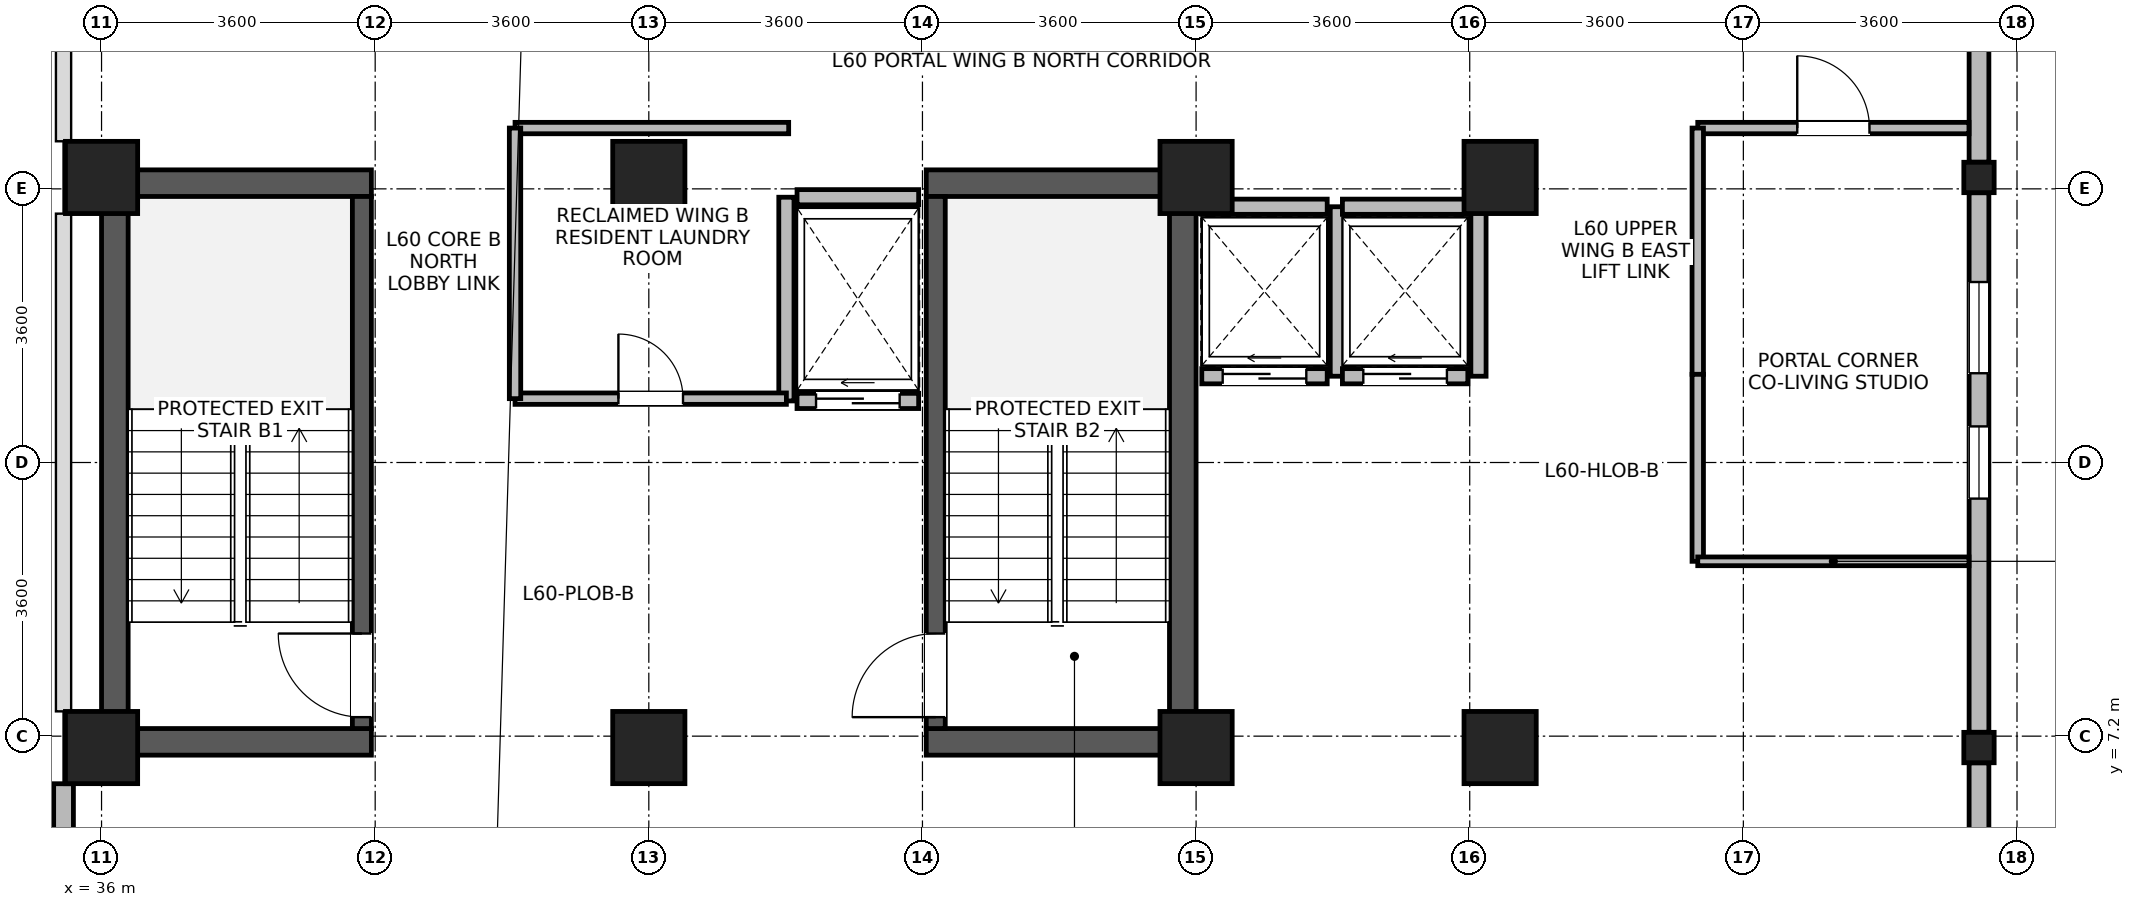
"""IFC4 building model, lengths in metres.
Left out: names, types, materials, properties, quantities, classifications, styles, units other than length and angle.
Written with IfcOpenShell. Run it as: python <this file> out.ifc"""

import sys

from ifc_helpers import new_model, si_unit, direction, frame, frame_2d, origin, origin_2d, place, context, subcontext, project, spatial, rectangle, i_section, extrude, source, transform, mapped, element, fill, save


model = new_model("IFC4")
c1 = context("Model", 3, precision=1e-05, world=origin(), true_north=direction((0.0, 1.0)))
c2 = subcontext(c1, "Body", "Model", "MODEL_VIEW")
j1 = project(units=[si_unit("LENGTHUNIT", "METRE"), si_unit("PLANEANGLEUNIT", "RADIAN")], contexts=[c1])
p1 = place(None, origin())
s1 = spatial("IfcSite", under=j1, at=p1, CompositionType="ELEMENT")
p2 = place(p1, origin())
s2 = spatial("IfcBuilding", under=s1, at=p2, CompositionType="ELEMENT")
p3 = place(p2, frame((0.0, 0.0, 235.1)))
s3 = spatial("IfcBuildingStorey", under=s2, at=p3, CompositionType="ELEMENT", Elevation=235.1)
for number, where, z_axis, x_axis in (
    (1, (36.175, 6.95, 0.0), (0.0, 0.0, 1.0), (0.0, 1.0, 0.0)),
    (2, (50.225, 6.95, 0.0), (0.0, 0.0, 1.0), (0.0, 1.0, 0.0)),
):
    element("IfcWall", number, at=place(p3, frame(where, z_axis=z_axis, x_axis=x_axis)), inside=s3, PredefinedType="SHEAR", context=c2, shape_type="SweptSolid", body=[
        extrude(rectangle(XDim=7.7, YDim=0.35, at=frame_2d((3.85, 0.0))), origin(), (0.0, 0.0, 1.0), 3.44),
    ])
for number, where, z_axis, x_axis in (
    (3, (36.35, 7.125, 0.0), (0.0, 0.0, 1.0), (1.0, 0.0, 0.0)),
    (4, (46.85, 7.125, 0.0), (0.0, 0.0, 1.0), (1.0, 0.0, 0.0)),
    (5, (36.35, 14.475, 0.0), (0.0, 0.0, 1.0), (1.0, 0.0, 0.0)),
    (6, (46.85, 14.475, 0.0), (0.0, 0.0, 1.0), (1.0, 0.0, 0.0)),
):
    element("IfcWall", number, at=place(p3, frame(where, z_axis=z_axis, x_axis=x_axis)), inside=s3, PredefinedType="SHEAR", context=c2, shape_type="SweptSolid", body=[
        extrude(rectangle(XDim=3.2, YDim=0.35, at=frame_2d((1.6, 0.0))), origin(), (0.0, 0.0, 1.0), 3.44),
    ])
p4 = place(p3, frame((39.425, 7.3, 0.0), z_axis=(0.0, 0.0, 1.0), x_axis=(0.0, 1.0, 0.0)))
e7 = element("IfcWall", 7, at=p4, inside=s3, PredefinedType="SHEAR", context=c2, shape_type="SweptSolid", body=[
    extrude(rectangle(XDim=7.0, YDim=0.25, at=frame_2d((3.5, 0.0))), origin(), (0.0, 0.0, 1.0), 3.44),
])
p5 = place(p4, frame((0.15, 0.0, 0.0)))
e8 = element("IfcOpeningElement", 8, at=p5, cuts=e7, PredefinedType="OPENING", context=c2, shape_type="SweptSolid", body=[
    extrude(rectangle(XDim=1.1, YDim=2.08, at=frame_2d((0.55, 1.04))), frame((0.0, 0.135, 0.0), z_axis=(0.0, -1.0, 0.0), x_axis=(1.0, 0.0, 0.0)), (0.0, 0.0, 1.0), 0.27),
])
p6 = place(p3, frame((46.975, 7.3, 0.0), z_axis=(0.0, 0.0, 1.0), x_axis=(0.0, 1.0, 0.0)))
e9 = element("IfcWall", 9, at=p6, inside=s3, PredefinedType="SHEAR", context=c2, shape_type="SweptSolid", body=[
    extrude(rectangle(XDim=7.0, YDim=0.25, at=frame_2d((3.5, 0.0))), origin(), (0.0, 0.0, 1.0), 3.44),
])
p7 = place(p6, frame((0.15, 0.0, 0.0)))
e10 = element("IfcOpeningElement", 10, at=p7, cuts=e9, PredefinedType="OPENING", context=c2, shape_type="SweptSolid", body=[
    extrude(rectangle(XDim=1.1, YDim=2.08, at=frame_2d((0.55, 1.04))), frame((0.0, 0.135, 0.0), z_axis=(0.0, -1.0, 0.0), x_axis=(1.0, 0.0, 0.0)), (0.0, 0.0, 1.0), 0.27),
])
m1 = source(origin(), c2, "Body", "SweptSolid", [
    extrude(rectangle(XDim=0.95, YDim=0.95, at=origin_2d()), origin(), (0.0, 0.0, 1.0), 3.7),
])
for number, where, z_axis, x_axis in (
    (11, (36.0, 7.05, 0.0), (0.0, 0.0, 1.0), (1.0, 0.0, 0.0)),
    (12, (36.0, 14.55, 0.0), (0.0, 0.0, 1.0), (1.0, 0.0, 0.0)),
    (13, (43.2, 7.05, 0.0), (0.0, 0.0, 1.0), (1.0, 0.0, 0.0)),
    (14, (43.2, 14.55, 0.0), (0.0, 0.0, 1.0), (1.0, 0.0, 0.0)),
    (15, (50.4, 7.05, 0.0), (0.0, 0.0, 1.0), (1.0, 0.0, 0.0)),
    (16, (50.4, 14.55, 0.0), (0.0, 0.0, 1.0), (1.0, 0.0, 0.0)),
    (17, (54.4, 7.05, 0.0), (0.0, 0.0, 1.0), (1.0, 0.0, 0.0)),
    (18, (54.4, 14.55, 0.0), (0.0, 0.0, 1.0), (1.0, 0.0, 0.0)),
):
    element("IfcColumn", number, at=place(p3, frame(where, z_axis=z_axis, x_axis=x_axis)), inside=s3, PredefinedType="COLUMN", context=c2, shape_type="MappedRepresentation", body=[
        mapped(m1, transform((0.0, 0.0, 0.0), x_axis=(1.0, 0.0, 0.0), y_axis=(0.0, 1.0, 0.0), z_axis=(0.0, 0.0, 1.0), scale=1.0)),
    ])
m2 = source(origin(), c2, "Body", "SweptSolid", [
    extrude(i_section(OverallWidth=0.399, OverallDepth=0.4, WebThickness=0.017, FlangeThickness=0.023, FilletRadius=0.015, at=origin_2d()), origin(), (0.0, 0.0, 1.0), 3.7),
])
for number, where, z_axis, x_axis in (
    (19, (60.7, 7.05, 0.0), (0.0, 0.0, 1.0), (1.0, 0.0, 0.0)),
    (20, (60.7, 14.55, 0.0), (0.0, 0.0, 1.0), (1.0, 0.0, 0.0)),
):
    element("IfcColumn", number, at=place(p3, frame(where, z_axis=z_axis, x_axis=x_axis)), inside=s3, PredefinedType="COLUMN", context=c2, shape_type="MappedRepresentation", body=[
        mapped(m2, transform((0.0, 0.0, 0.0), x_axis=(1.0, 0.0, 0.0), y_axis=(0.0, 1.0, 0.0), z_axis=(0.0, 0.0, 1.0), scale=1.0)),
    ])
p8 = place(p3, frame((60.7, 6.849, 0.0), z_axis=(0.0, 0.0, 1.0), x_axis=(0.0, -1.0, 0.0)))
e21 = element("IfcWall", 21, at=p8, inside=s3, PredefinedType="STANDARD", context=c2, shape_type="SweptSolid", body=[
    extrude(rectangle(XDim=1.179, YDim=0.26, at=frame_2d((0.59, 0.0))), origin(), (0.0, 0.0, 1.0), 3.42),
])
p9 = place(p3, frame((60.7, 14.349, 0.0), z_axis=(0.0, 0.0, 1.0), x_axis=(0.0, -1.0, 0.0)))
e22 = element("IfcWall", 22, at=p9, inside=s3, PredefinedType="STANDARD", context=c2, shape_type="SweptSolid", body=[
    extrude(rectangle(XDim=7.098, YDim=0.26, at=frame_2d((3.549, 0.0))), origin(), (0.0, 0.0, 1.0), 3.02),
])
p10 = place(p9, frame((1.175, 0.0, 0.85)))
e23 = element("IfcOpeningElement", 23, at=p10, cuts=e22, PredefinedType="OPENING", context=c2, shape_type="SweptSolid", body=[
    extrude(rectangle(XDim=1.2, YDim=1.75, at=frame_2d((0.6, 0.875))), frame((0.0, 0.14, 0.0), z_axis=(0.0, -1.0, 0.0), x_axis=(1.0, 0.0, 0.0)), (0.0, 0.0, 1.0), 0.28),
])
p11 = place(p9, frame((3.074, 0.0, 0.85)))
e24 = element("IfcOpeningElement", 24, at=p11, cuts=e22, PredefinedType="OPENING", context=c2, shape_type="SweptSolid", body=[
    extrude(rectangle(XDim=0.95, YDim=1.75, at=frame_2d((0.475, 0.875))), frame((0.0, 0.14, 0.0), z_axis=(0.0, -1.0, 0.0), x_axis=(1.0, 0.0, 0.0)), (0.0, 0.0, 1.0), 0.28),
])
p12 = place(p3, frame((60.7, 21.399, 0.0), z_axis=(0.0, 0.0, 1.0), x_axis=(0.0, -1.0, 0.0)))
e25 = element("IfcWall", 25, at=p12, inside=s3, PredefinedType="STANDARD", context=c2, shape_type="SweptSolid", body=[
    extrude(rectangle(XDim=6.648, YDim=0.26, at=frame_2d((3.324, 0.0))), origin(), (0.0, 0.0, 1.0), 3.02),
])
p13 = place(p12, frame((1.062, 0.0, 0.85)))
e26 = element("IfcOpeningElement", 26, at=p13, cuts=e25, PredefinedType="OPENING", context=c2, shape_type="SweptSolid", body=[
    extrude(rectangle(XDim=1.2, YDim=1.75, at=frame_2d((0.6, 0.875))), frame((0.0, 0.14, 0.0), z_axis=(0.0, -1.0, 0.0), x_axis=(1.0, 0.0, 0.0)), (0.0, 0.0, 1.0), 0.28),
])
p14 = place(p12, frame((2.849, 0.0, 0.85)))
e27 = element("IfcOpeningElement", 27, at=p14, cuts=e25, PredefinedType="OPENING", context=c2, shape_type="SweptSolid", body=[
    extrude(rectangle(XDim=0.95, YDim=1.75, at=frame_2d((0.475, 0.875))), frame((0.0, 0.14, 0.0), z_axis=(0.0, -1.0, 0.0), x_axis=(1.0, 0.0, 0.0)), (0.0, 0.0, 1.0), 0.28),
])
p15 = place(p3, frame((35.5, 5.8, 0.0), z_axis=(0.0, 0.0, 1.0), x_axis=(0.0, 1.0, 0.0)))
e28 = element("IfcWall", 28, at=p15, inside=s3, PredefinedType="STANDARD", context=c2, shape_type="SweptSolid", body=[
    extrude(rectangle(XDim=0.774, YDim=0.26, at=frame_2d((0.387, 0.0))), origin(), (0.0, 0.0, 1.0), 3.44),
])
p16 = place(p3, frame((50.475, 11.935, 0.0), z_axis=(0.0, 0.0, 1.0), x_axis=(1.0, 0.0, 0.0)))
e29 = element("IfcWall", 29, at=p16, inside=s3, PredefinedType="PARTITIONING", context=c2, shape_type="SweptSolid", body=[
    extrude(rectangle(XDim=1.65, YDim=0.2, at=frame_2d((0.825, 0.0))), origin(), (0.0, 0.0, 1.0), 3.42),
])
p17 = place(p16, frame((0.275, 0.0, 0.0)))
e30 = element("IfcOpeningElement", 30, at=p17, cuts=e29, PredefinedType="OPENING", context=c2, shape_type="SweptSolid", body=[
    extrude(rectangle(XDim=1.1, YDim=2.12, at=frame_2d((0.55, 1.06))), frame((0.0, 0.11, 0.0), z_axis=(0.0, -1.0, 0.0), x_axis=(1.0, 0.0, 0.0)), (0.0, 0.0, 1.0), 0.22),
])
p18 = place(p3, frame((50.475, 14.165, 0.0), z_axis=(0.0, 0.0, 1.0), x_axis=(1.0, 0.0, 0.0)))
e31 = element("IfcWall", 31, at=p18, inside=s3, PredefinedType="PARTITIONING", context=c2, shape_type="SweptSolid", body=[
    extrude(rectangle(XDim=1.65, YDim=0.2, at=frame_2d((0.825, 0.0))), origin(), (0.0, 0.0, 1.0), 3.42),
])
p19 = place(p3, frame((52.265, 11.935, 0.0), z_axis=(0.0, 0.0, 1.0), x_axis=(0.0, 1.0, 0.0)))
e32 = element("IfcWall", 32, at=p19, inside=s3, PredefinedType="PARTITIONING", context=c2, shape_type="SweptSolid", body=[
    extrude(rectangle(XDim=2.23, YDim=0.2, at=frame_2d((1.115, 0.0))), origin(), (0.0, 0.0, 1.0), 3.42),
])
p20 = place(p3, frame((52.325, 11.935, 0.0), z_axis=(0.0, 0.0, 1.0), x_axis=(1.0, 0.0, 0.0)))
e33 = element("IfcWall", 33, at=p20, inside=s3, PredefinedType="PARTITIONING", context=c2, shape_type="SweptSolid", body=[
    extrude(rectangle(XDim=1.65, YDim=0.2, at=frame_2d((0.825, 0.0))), origin(), (0.0, 0.0, 1.0), 3.42),
])
p21 = place(p20, frame((0.275, 0.0, 0.0)))
e34 = element("IfcOpeningElement", 34, at=p21, cuts=e33, PredefinedType="OPENING", context=c2, shape_type="SweptSolid", body=[
    extrude(rectangle(XDim=1.1, YDim=2.12, at=frame_2d((0.55, 1.06))), frame((0.0, 0.11, 0.0), z_axis=(0.0, -1.0, 0.0), x_axis=(1.0, 0.0, 0.0)), (0.0, 0.0, 1.0), 0.22),
])
p22 = place(p3, frame((52.325, 14.165, 0.0), z_axis=(0.0, 0.0, 1.0), x_axis=(1.0, 0.0, 0.0)))
e35 = element("IfcWall", 35, at=p22, inside=s3, PredefinedType="PARTITIONING", context=c2, shape_type="SweptSolid", body=[
    extrude(rectangle(XDim=1.65, YDim=0.2, at=frame_2d((0.825, 0.0))), origin(), (0.0, 0.0, 1.0), 3.42),
])
p23 = place(p3, frame((54.115, 11.935, 0.0), z_axis=(0.0, 0.0, 1.0), x_axis=(0.0, 1.0, 0.0)))
e36 = element("IfcWall", 36, at=p23, inside=s3, PredefinedType="PARTITIONING", context=c2, shape_type="SweptSolid", body=[
    extrude(rectangle(XDim=2.23, YDim=0.2, at=frame_2d((1.115, 0.0))), origin(), (0.0, 0.0, 1.0), 3.42),
])
p24 = place(p3, frame((45.15, 11.61, 0.0), z_axis=(0.0, 0.0, 1.0), x_axis=(1.0, 0.0, 0.0)))
e37 = element("IfcWall", 37, at=p24, inside=s3, PredefinedType="PARTITIONING", context=c2, shape_type="SweptSolid", body=[
    extrude(rectangle(XDim=1.6, YDim=0.2, at=frame_2d((0.8, 0.0))), origin(), (0.0, 0.0, 1.0), 3.42),
])
p25 = place(p24, frame((0.25, 0.0, 0.0)))
e38 = element("IfcOpeningElement", 38, at=p25, cuts=e37, PredefinedType="OPENING", context=c2, shape_type="SweptSolid", body=[
    extrude(rectangle(XDim=1.1, YDim=2.12, at=frame_2d((0.55, 1.06))), frame((0.0, 0.11, 0.0), z_axis=(0.0, -1.0, 0.0), x_axis=(1.0, 0.0, 0.0)), (0.0, 0.0, 1.0), 0.22),
])
p26 = place(p3, frame((45.15, 14.29, 0.0), z_axis=(0.0, 0.0, 1.0), x_axis=(1.0, 0.0, 0.0)))
e39 = element("IfcWall", 39, at=p26, inside=s3, PredefinedType="PARTITIONING", context=c2, shape_type="SweptSolid", body=[
    extrude(rectangle(XDim=1.6, YDim=0.2, at=frame_2d((0.8, 0.0))), origin(), (0.0, 0.0, 1.0), 2.52),
])
p27 = place(p3, frame((45.01, 11.61, 0.0), z_axis=(0.0, 0.0, 1.0), x_axis=(0.0, 1.0, 0.0)))
e40 = element("IfcWall", 40, at=p27, inside=s3, PredefinedType="PARTITIONING", context=c2, shape_type="SweptSolid", body=[
    extrude(rectangle(XDim=2.68, YDim=0.2, at=frame_2d((1.34, 0.0))), origin(), (0.0, 0.0, 1.0), 3.42),
])
p28 = place(p3, frame((57.0, 15.2, 0.0), z_axis=(0.0, 0.0, 1.0), x_axis=(1.0, 0.0, 0.0)))
e41 = element("IfcWall", 41, at=p28, inside=s3, PredefinedType="PARTITIONING", context=c2, shape_type="SweptSolid", body=[
    extrude(rectangle(XDim=3.568, YDim=0.15, at=frame_2d((1.784, 0.0))), origin(), (0.0, 0.0, 1.0), 3.42),
])
p29 = place(p28, frame((1.309, 0.0, 0.0)))
e42 = element("IfcOpeningElement", 42, at=p29, cuts=e41, PredefinedType="OPENING", context=c2, shape_type="SweptSolid", body=[
    extrude(rectangle(XDim=0.95, YDim=2.1, at=frame_2d((0.475, 1.05))), frame((0.0, 0.085, 0.0), z_axis=(0.0, -1.0, 0.0), x_axis=(1.0, 0.0, 0.0)), (0.0, 0.0, 1.0), 0.17),
])
p30 = place(p3, frame((41.44, 11.64, 0.0), z_axis=(0.0, 0.0, 1.0), x_axis=(1.0, 0.0, 0.0)))
e43 = element("IfcWall", 43, at=p30, inside=s3, PredefinedType="PARTITIONING", context=c2, shape_type="SweptSolid", body=[
    extrude(rectangle(XDim=3.57, YDim=0.15, at=frame_2d((1.785, 0.0))), origin(), (0.0, 0.0, 1.0), 3.42),
])
p31 = place(p30, frame((1.36, 0.0, 0.0)))
e44 = element("IfcOpeningElement", 44, at=p31, cuts=e43, PredefinedType="OPENING", context=c2, shape_type="SweptSolid", body=[
    extrude(rectangle(XDim=0.85, YDim=2.04, at=frame_2d((0.425, 1.02))), frame((0.0, 0.085, 0.0), z_axis=(0.0, -1.0, 0.0), x_axis=(1.0, 0.0, 0.0)), (0.0, 0.0, 1.0), 0.17),
])
p32 = place(p3, frame((41.44, 15.2, 0.0), z_axis=(0.0, 0.0, 1.0), x_axis=(1.0, 0.0, 0.0)))
e45 = element("IfcWall", 45, at=p32, inside=s3, PredefinedType="PARTITIONING", context=c2, shape_type="SweptSolid", body=[
    extrude(rectangle(XDim=3.6, YDim=0.15, at=frame_2d((1.8, 0.0))), origin(), (0.0, 0.0, 1.0), 3.42),
])
p33 = place(p3, frame((41.44, 11.64, 0.0), z_axis=(0.0, 0.0, 1.0), x_axis=(0.0, 1.0, 0.0)))
e46 = element("IfcWall", 46, at=p33, inside=s3, PredefinedType="PARTITIONING", context=c2, shape_type="SweptSolid", body=[
    extrude(rectangle(XDim=3.56, YDim=0.15, at=frame_2d((1.78, 0.0))), origin(), (0.0, 0.0, 1.0), 3.42),
])
p34 = place(p3, frame((57.0, 11.96, 0.0), z_axis=(0.0, 0.0, 1.0), x_axis=(0.0, 1.0, 0.0)))
e47 = element("IfcWall", 47, at=p34, inside=s3, PredefinedType="PARTITIONING", context=c2, shape_type="SweptSolid", body=[
    extrude(rectangle(XDim=3.24, YDim=0.15, at=frame_2d((1.62, 0.0))), origin(), (0.0, 0.0, 1.0), 3.42),
])
p35 = place(p3, frame((57.0, 9.5, 0.0), z_axis=(0.0, 0.0, 1.0), x_axis=(0.0, 1.0, 0.0)))
e48 = element("IfcWall", 48, at=p35, inside=s3, PredefinedType="PARTITIONING", context=c2, shape_type="SweptSolid", body=[
    extrude(rectangle(XDim=2.46, YDim=0.15, at=frame_2d((1.23, 0.0))), origin(), (0.0, 0.0, 1.0), 3.42),
])
p36 = place(p3, frame((57.0, 9.5, 0.0), z_axis=(0.0, 0.0, 1.0), x_axis=(1.0, 0.0, 0.0)))
e49 = element("IfcWall", 49, at=p36, inside=s3, PredefinedType="PARTITIONING", context=c2, shape_type="SweptSolid", body=[
    extrude(rectangle(XDim=3.568, YDim=0.115, at=frame_2d((1.784, 0.0))), origin(), (0.0, 0.0, 1.0), 3.42),
])
p37 = place(p10, origin())
e50 = element("IfcWindow", 50, at=p37, inside=s3, PartitioningType="SINGLE_PANEL", PredefinedType="WINDOW", context=c2, shape_type="SweptSolid", body=[
    extrude(rectangle(XDim=1.2, YDim=1.75, at=frame_2d((0.6, 0.875))), frame((0.0, 0.03, 0.0), z_axis=(0.0, -1.0, 0.0), x_axis=(1.0, 0.0, 0.0)), (0.0, 0.0, 1.0), 0.06),
])
fill(e23, e50)
p38 = place(p11, origin())
e51 = element("IfcWindow", 51, at=p38, inside=s3, PartitioningType="SINGLE_PANEL", PredefinedType="WINDOW", context=c2, shape_type="SweptSolid", body=[
    extrude(rectangle(XDim=0.95, YDim=1.75, at=frame_2d((0.475, 0.875))), frame((0.0, 0.03, 0.0), z_axis=(0.0, -1.0, 0.0), x_axis=(1.0, 0.0, 0.0)), (0.0, 0.0, 1.0), 0.06),
])
fill(e24, e51)
p39 = place(p5, origin())
e52 = element("IfcDoor", 52, at=p39, inside=s3, OperationType="SINGLE_SWING_RIGHT", PredefinedType="DOOR", context=c2, shape_type="SweptSolid", body=[
    extrude(rectangle(XDim=1.1, YDim=2.08, at=frame_2d((0.55, 1.04))), frame((0.0, 0.025, 0.0), z_axis=(0.0, -1.0, 0.0), x_axis=(1.0, 0.0, 0.0)), (0.0, 0.0, 1.0), 0.05),
])
fill(e8, e52)
p40 = place(p7, origin())
e53 = element("IfcDoor", 53, at=p40, inside=s3, OperationType="SINGLE_SWING_LEFT", PredefinedType="DOOR", context=c2, shape_type="SweptSolid", body=[
    extrude(rectangle(XDim=1.1, YDim=2.08, at=frame_2d((0.55, 1.04))), frame((0.0, 0.025, 0.0), z_axis=(0.0, -1.0, 0.0), x_axis=(1.0, 0.0, 0.0)), (0.0, 0.0, 1.0), 0.05),
])
fill(e10, e53)
p41 = place(p17, origin())
e54 = element("IfcDoor", 54, at=p41, inside=s3, OperationType="SLIDING_TO_LEFT", PredefinedType="DOOR", context=c2, shape_type="SweptSolid", body=[
    extrude(rectangle(XDim=1.1, YDim=2.12, at=frame_2d((0.55, 1.06))), frame((0.0, 0.025, 0.0), z_axis=(0.0, -1.0, 0.0), x_axis=(1.0, 0.0, 0.0)), (0.0, 0.0, 1.0), 0.05),
])
fill(e30, e54)
p42 = place(p21, origin())
e55 = element("IfcDoor", 55, at=p42, inside=s3, OperationType="SLIDING_TO_LEFT", PredefinedType="DOOR", context=c2, shape_type="SweptSolid", body=[
    extrude(rectangle(XDim=1.1, YDim=2.12, at=frame_2d((0.55, 1.06))), frame((0.0, 0.025, 0.0), z_axis=(0.0, -1.0, 0.0), x_axis=(1.0, 0.0, 0.0)), (0.0, 0.0, 1.0), 0.05),
])
fill(e34, e55)
p43 = place(p25, origin())
e56 = element("IfcDoor", 56, at=p43, inside=s3, OperationType="SLIDING_TO_LEFT", PredefinedType="DOOR", context=c2, shape_type="SweptSolid", body=[
    extrude(rectangle(XDim=1.1, YDim=2.12, at=frame_2d((0.55, 1.06))), frame((0.0, 0.025, 0.0), z_axis=(0.0, -1.0, 0.0), x_axis=(1.0, 0.0, 0.0)), (0.0, 0.0, 1.0), 0.05),
])
fill(e38, e56)
p44 = place(p29, origin())
e57 = element("IfcDoor", 57, at=p44, inside=s3, OperationType="SINGLE_SWING_LEFT", PredefinedType="DOOR", context=c2, shape_type="SweptSolid", body=[
    extrude(rectangle(XDim=0.95, YDim=2.1, at=frame_2d((0.475, 1.05))), frame((0.0, 0.025, 0.0), z_axis=(0.0, -1.0, 0.0), x_axis=(1.0, 0.0, 0.0)), (0.0, 0.0, 1.0), 0.05),
])
fill(e42, e57)
p45 = place(p31, origin())
e58 = element("IfcDoor", 58, at=p45, inside=s3, OperationType="SINGLE_SWING_LEFT", PredefinedType="DOOR", context=c2, shape_type="SweptSolid", body=[
    extrude(rectangle(XDim=0.85, YDim=2.04, at=frame_2d((0.425, 1.02))), frame((0.0, 0.025, 0.0), z_axis=(0.0, -1.0, 0.0), x_axis=(1.0, 0.0, 0.0)), (0.0, 0.0, 1.0), 0.05),
])
fill(e44, e58)
save(model, sys.argv[1])
